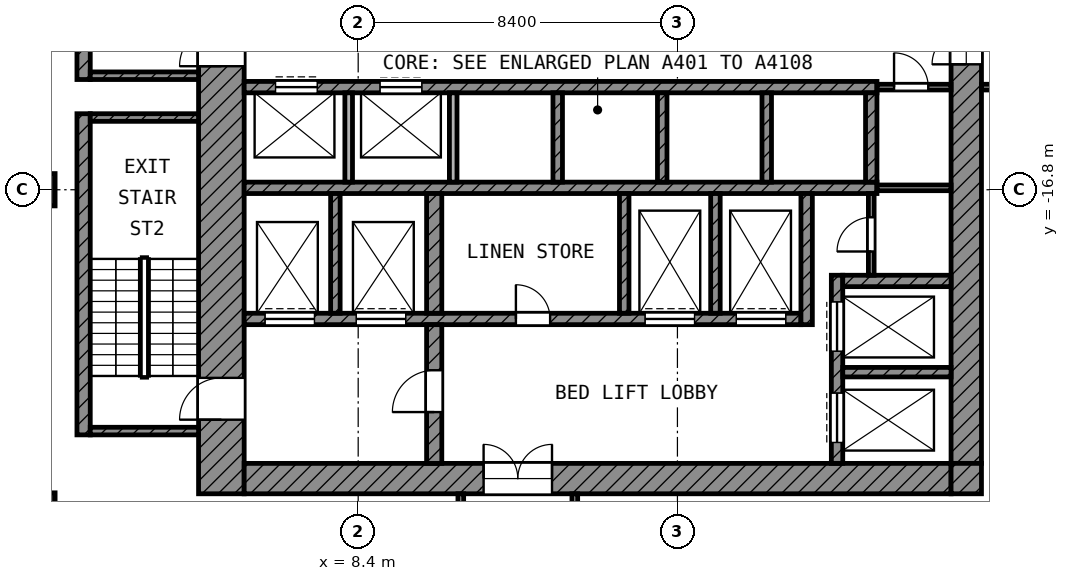
"""IFC4 building model, lengths in metres.
Left out: names, types, materials, properties, quantities, classifications, styles, units other than length and angle.
Written with IfcOpenShell. Run it as: python <this file> out.ifc"""

import sys

from ifc_helpers import new_model, si_unit, direction, frame, frame_2d, origin, origin_2d, place, context, subcontext, project, spatial, rectangle, extrude, element, fill, save


model = new_model("IFC4")
c1 = context("Model", 3, precision=1e-05, world=origin(), true_north=direction((0.0, 1.0)))
c2 = subcontext(c1, "Body", "Model", "MODEL_VIEW")
j1 = project(units=[si_unit("LENGTHUNIT", "METRE"), si_unit("PLANEANGLEUNIT", "RADIAN")], contexts=[c1])
p1 = place(None, origin())
s1 = spatial("IfcSite", under=j1, at=p1, CompositionType="ELEMENT")
p2 = place(p1, origin())
s2 = spatial("IfcBuilding", under=s1, at=p2, CompositionType="ELEMENT")
p3 = place(p2, frame((0.0, 0.0, 247.4)))
s3 = spatial("IfcBuildingStorey", under=s2, at=p3, CompositionType="ELEMENT", Elevation=247.4)
for number, where, z_axis, x_axis in (
    (1, (0.0, -16.8, 0.0), (0.0, 0.0, 1.0), (1.0, 0.0, 0.0)),
    (2, (0.0, -25.2, 0.0), (0.0, 0.0, 1.0), (1.0, 0.0, 0.0)),
):
    element("IfcColumn", number, at=place(p3, frame(where, z_axis=z_axis, x_axis=x_axis)), inside=s3, PredefinedType="COLUMN", context=c2, shape_type="SweptSolid", body=[
        extrude(rectangle(XDim=0.85, YDim=0.85, at=origin_2d()), origin(), (0.0, 0.0, 1.0), 4.2),
    ])
p4 = place(p3, frame((4.8, -24.8, 0.0), z_axis=(0.0, 0.0, 1.0), x_axis=(0.0, 1.0, 0.0)))
e3 = element("IfcWall", 3, at=p4, inside=s3, PredefinedType="SHEAR", context=c2, shape_type="SweptSolid", body=[
    extrude(rectangle(XDim=19.4, YDim=1.2, at=frame_2d((9.7, 0.0))), origin(), (0.0, 0.0, 1.0), 3.6),
])
p5 = place(p4, frame((11.25, 0.0, 0.0)))
e4 = element("IfcOpeningElement", 4, at=p5, cuts=e3, PredefinedType="OPENING", context=c2, shape_type="SweptSolid", body=[
    extrude(rectangle(XDim=1.1, YDim=2.1, at=frame_2d((0.55, 1.05))), frame((0.0, 0.61, 0.0), z_axis=(0.0, -1.0, 0.0), x_axis=(1.0, 0.0, 0.0)), (0.0, 0.0, 1.0), 1.22),
])
p6 = place(p4, frame((1.95, 0.0, 0.0)))
e5 = element("IfcOpeningElement", 5, at=p6, cuts=e3, PredefinedType="OPENING", context=c2, shape_type="SweptSolid", body=[
    extrude(rectangle(XDim=1.1, YDim=2.1, at=frame_2d((0.55, 1.05))), frame((0.0, 0.61, 0.0), z_axis=(0.0, -1.0, 0.0), x_axis=(1.0, 0.0, 0.0)), (0.0, 0.0, 1.0), 1.22),
])
p7 = place(p3, frame((24.4, -24.0, 0.0), z_axis=(0.0, 0.0, 1.0), x_axis=(0.0, 1.0, 0.0)))
e6 = element("IfcWall", 6, at=p7, inside=s3, PredefinedType="SHEAR", context=c2, shape_type="SweptSolid", body=[
    extrude(rectangle(XDim=18.6, YDim=0.8, at=frame_2d((9.3, 0.0))), origin(), (0.0, 0.0, 1.0), 3.6),
])
p8 = place(p7, frame((10.5, 0.0, 0.0)))
e7 = element("IfcOpeningElement", 7, at=p8, cuts=e6, PredefinedType="OPENING", context=c2, shape_type="SweptSolid", body=[
    extrude(rectangle(XDim=1.8, YDim=2.1, at=frame_2d((0.9, 1.05))), frame((0.0, 0.41, 0.0), z_axis=(0.0, -1.0, 0.0), x_axis=(1.0, 0.0, 0.0)), (0.0, 0.0, 1.0), 0.82),
])
p9 = place(p3, frame((5.4, -24.4, 0.0), z_axis=(0.0, 0.0, 1.0), x_axis=(1.0, 0.0, 0.0)))
e8 = element("IfcWall", 8, at=p9, inside=s3, PredefinedType="SHEAR", context=c2, shape_type="SweptSolid", body=[
    extrude(rectangle(XDim=18.6, YDim=0.8, at=frame_2d((9.3, 0.0))), origin(), (0.0, 0.0, 1.0), 3.6),
])
p10 = place(p9, frame((6.3, 0.0, 0.0)))
e9 = element("IfcOpeningElement", 9, at=p10, cuts=e8, PredefinedType="OPENING", context=c2, shape_type="SweptSolid", body=[
    extrude(rectangle(XDim=1.8, YDim=2.1, at=frame_2d((0.9, 1.05))), frame((0.0, 0.41, 0.0), z_axis=(0.0, -1.0, 0.0), x_axis=(1.0, 0.0, 0.0)), (0.0, 0.0, 1.0), 0.82),
])
p11 = place(p3, frame((24.4, -24.8, 0.0), z_axis=(0.0, 0.0, 1.0), x_axis=(0.0, 1.0, 0.0)))
e10 = element("IfcWall", 10, at=p11, inside=s3, PredefinedType="SHEAR", context=c2, shape_type="SweptSolid", body=[
    extrude(rectangle(XDim=0.8, YDim=0.8, at=frame_2d((0.4, 0.0))), origin(), (0.0, 0.0, 1.0), 3.6),
])
p12 = place(p3, frame((5.4, -14.1, 0.0), z_axis=(0.0, 0.0, 1.0), x_axis=(1.0, 0.0, 0.0)))
e11 = element("IfcWall", 11, at=p12, inside=s3, PredefinedType="SHEAR", context=c2, shape_type="SweptSolid", body=[
    extrude(rectangle(XDim=16.65, YDim=0.3, at=frame_2d((8.325, 0.0))), origin(), (0.0, 0.0, 1.0), 3.6),
])
p13 = place(p12, frame((0.825, 0.0, 0.0)))
e12 = element("IfcOpeningElement", 12, at=p13, cuts=e11, PredefinedType="OPENING", context=c2, shape_type="SweptSolid", body=[
    extrude(rectangle(XDim=1.1, YDim=2.1, at=frame_2d((0.55, 1.05))), frame((0.0, 0.16, 0.0), z_axis=(0.0, -1.0, 0.0), x_axis=(1.0, 0.0, 0.0)), (0.0, 0.0, 1.0), 0.32),
])
p14 = place(p12, frame((3.575, 0.0, 0.0)))
e13 = element("IfcOpeningElement", 13, at=p14, cuts=e11, PredefinedType="OPENING", context=c2, shape_type="SweptSolid", body=[
    extrude(rectangle(XDim=1.1, YDim=2.1, at=frame_2d((0.55, 1.05))), frame((0.0, 0.16, 0.0), z_axis=(0.0, -1.0, 0.0), x_axis=(1.0, 0.0, 0.0)), (0.0, 0.0, 1.0), 0.32),
])
p15 = place(p3, frame((5.4, -16.75, 0.0), z_axis=(0.0, 0.0, 1.0), x_axis=(1.0, 0.0, 0.0)))
e14 = element("IfcWall", 14, at=p15, inside=s3, PredefinedType="SHEAR", context=c2, shape_type="SweptSolid", body=[
    extrude(rectangle(XDim=16.65, YDim=0.3, at=frame_2d((8.325, 0.0))), origin(), (0.0, 0.0, 1.0), 3.6),
])
p16 = place(p3, frame((5.4, -20.2, 0.0), z_axis=(0.0, 0.0, 1.0), x_axis=(1.0, 0.0, 0.0)))
e15 = element("IfcWall", 15, at=p16, inside=s3, PredefinedType="SHEAR", context=c2, shape_type="SweptSolid", body=[
    extrude(rectangle(XDim=14.65, YDim=0.3, at=frame_2d((7.325, 0.0))), origin(), (0.0, 0.0, 1.0), 3.6),
])
p17 = place(p16, frame((10.55, 0.0, 0.0)))
e16 = element("IfcOpeningElement", 16, at=p17, cuts=e15, PredefinedType="OPENING", context=c2, shape_type="SweptSolid", body=[
    extrude(rectangle(XDim=1.3, YDim=2.1, at=frame_2d((0.65, 1.05))), frame((0.0, 0.16, 0.0), z_axis=(0.0, -1.0, 0.0), x_axis=(1.0, 0.0, 0.0)), (0.0, 0.0, 1.0), 0.32),
])
p18 = place(p16, frame((12.95, 0.0, 0.0)))
e17 = element("IfcOpeningElement", 17, at=p18, cuts=e15, PredefinedType="OPENING", context=c2, shape_type="SweptSolid", body=[
    extrude(rectangle(XDim=1.3, YDim=2.1, at=frame_2d((0.65, 1.05))), frame((0.0, 0.16, 0.0), z_axis=(0.0, -1.0, 0.0), x_axis=(1.0, 0.0, 0.0)), (0.0, 0.0, 1.0), 0.32),
])
p19 = place(p16, frame((0.55, 0.0, 0.0)))
e18 = element("IfcOpeningElement", 18, at=p19, cuts=e15, PredefinedType="OPENING", context=c2, shape_type="SweptSolid", body=[
    extrude(rectangle(XDim=1.3, YDim=2.1, at=frame_2d((0.65, 1.05))), frame((0.0, 0.16, 0.0), z_axis=(0.0, -1.0, 0.0), x_axis=(1.0, 0.0, 0.0)), (0.0, 0.0, 1.0), 0.32),
])
p20 = place(p16, frame((2.95, 0.0, 0.0)))
e19 = element("IfcOpeningElement", 19, at=p20, cuts=e15, PredefinedType="OPENING", context=c2, shape_type="SweptSolid", body=[
    extrude(rectangle(XDim=1.3, YDim=2.1, at=frame_2d((0.65, 1.05))), frame((0.0, 0.16, 0.0), z_axis=(0.0, -1.0, 0.0), x_axis=(1.0, 0.0, 0.0)), (0.0, 0.0, 1.0), 0.32),
])
p21 = place(p16, frame((7.15, 0.0, 0.0)))
e20 = element("IfcOpeningElement", 20, at=p21, cuts=e15, PredefinedType="OPENING", context=c2, shape_type="SweptSolid", body=[
    extrude(rectangle(XDim=0.9, YDim=2.1, at=frame_2d((0.45, 1.05))), frame((0.0, 0.16, 0.0), z_axis=(0.0, -1.0, 0.0), x_axis=(1.0, 0.0, 0.0)), (0.0, 0.0, 1.0), 0.32),
])
p22 = place(p3, frame((10.4, -24.0, 0.0), z_axis=(0.0, 0.0, 1.0), x_axis=(0.0, 1.0, 0.0)))
e21 = element("IfcWall", 21, at=p22, inside=s3, PredefinedType="SHEAR", context=c2, shape_type="SweptSolid", body=[
    extrude(rectangle(XDim=3.65, YDim=0.4, at=frame_2d((1.825, 0.0))), origin(), (0.0, 0.0, 1.0), 3.6),
])
p23 = place(p22, frame((1.35, 0.0, 0.0)))
e22 = element("IfcOpeningElement", 22, at=p23, cuts=e21, PredefinedType="OPENING", context=c2, shape_type="SweptSolid", body=[
    extrude(rectangle(XDim=1.1, YDim=2.1, at=frame_2d((0.55, 1.05))), frame((0.0, 0.21, 0.0), z_axis=(0.0, -1.0, 0.0), x_axis=(1.0, 0.0, 0.0)), (0.0, 0.0, 1.0), 0.42),
])
p24 = place(p3, frame((10.4, -20.05, 0.0), z_axis=(0.0, 0.0, 1.0), x_axis=(0.0, 1.0, 0.0)))
e23 = element("IfcWall", 23, at=p24, inside=s3, PredefinedType="SHEAR", context=c2, shape_type="SweptSolid", body=[
    extrude(rectangle(XDim=3.15, YDim=0.4, at=frame_2d((1.575, 0.0))), origin(), (0.0, 0.0, 1.0), 3.6),
])
p25 = place(p3, frame((20.2, -20.35, 0.0), z_axis=(0.0, 0.0, 1.0), x_axis=(0.0, 1.0, 0.0)))
e24 = element("IfcWall", 24, at=p25, inside=s3, PredefinedType="SHEAR", context=c2, shape_type="SweptSolid", body=[
    extrude(rectangle(XDim=3.45, YDim=0.3, at=frame_2d((1.725, 0.0))), origin(), (0.0, 0.0, 1.0), 3.6),
])
p26 = place(p3, frame((21.9, -16.6, 0.0), z_axis=(0.0, 0.0, 1.0), x_axis=(0.0, 1.0, 0.0)))
e25 = element("IfcWall", 25, at=p26, inside=s3, PredefinedType="SHEAR", context=c2, shape_type="SweptSolid", body=[
    extrude(rectangle(XDim=2.35, YDim=0.3, at=frame_2d((1.175, 0.0))), origin(), (0.0, 0.0, 1.0), 3.6),
])
p27 = place(p3, frame((21.15, -19.2, 0.0), z_axis=(0.0, 0.0, 1.0), x_axis=(1.0, 0.0, 0.0)))
e26 = element("IfcWall", 26, at=p27, inside=s3, PredefinedType="SHEAR", context=c2, shape_type="SweptSolid", body=[
    extrude(rectangle(XDim=2.85, YDim=0.3, at=frame_2d((1.425, 0.0))), origin(), (0.0, 0.0, 1.0), 3.6),
])
p28 = place(p3, frame((21.0, -24.0, 0.0), z_axis=(0.0, 0.0, 1.0), x_axis=(0.0, 1.0, 0.0)))
e27 = element("IfcWall", 27, at=p28, inside=s3, PredefinedType="SHEAR", context=c2, shape_type="SweptSolid", body=[
    extrude(rectangle(XDim=4.95, YDim=0.3, at=frame_2d((2.475, 0.0))), origin(), (0.0, 0.0, 1.0), 3.6),
])
p29 = place(p28, frame((2.95, 0.0, 0.0)))
e28 = element("IfcOpeningElement", 28, at=p29, cuts=e27, PredefinedType="OPENING", context=c2, shape_type="SweptSolid", body=[
    extrude(rectangle(XDim=1.3, YDim=2.1, at=frame_2d((0.65, 1.05))), frame((0.0, 0.16, 0.0), z_axis=(0.0, -1.0, 0.0), x_axis=(1.0, 0.0, 0.0)), (0.0, 0.0, 1.0), 0.32),
])
p30 = place(p28, frame((0.55, 0.0, 0.0)))
e29 = element("IfcOpeningElement", 29, at=p30, cuts=e27, PredefinedType="OPENING", context=c2, shape_type="SweptSolid", body=[
    extrude(rectangle(XDim=1.3, YDim=2.1, at=frame_2d((0.65, 1.05))), frame((0.0, 0.16, 0.0), z_axis=(0.0, -1.0, 0.0), x_axis=(1.0, 0.0, 0.0)), (0.0, 0.0, 1.0), 0.32),
])
p31 = place(p3, frame((21.15, -21.6, 0.0), z_axis=(0.0, 0.0, 1.0), x_axis=(1.0, 0.0, 0.0)))
e30 = element("IfcWall", 30, at=p31, inside=s3, PredefinedType="SHEAR", context=c2, shape_type="SweptSolid", body=[
    extrude(rectangle(XDim=2.85, YDim=0.25, at=frame_2d((1.425, 0.0))), origin(), (0.0, 0.0, 1.0), 3.6),
])
for number, where, z_axis, x_axis in (
    (31, (7.8, -20.05, 0.0), (0.0, 0.0, 1.0), (0.0, 1.0, 0.0)),
    (32, (15.4, -20.05, 0.0), (0.0, 0.0, 1.0), (0.0, 1.0, 0.0)),
    (33, (17.8, -20.05, 0.0), (0.0, 0.0, 1.0), (0.0, 1.0, 0.0)),
):
    element("IfcWall", number, at=place(p3, frame(where, z_axis=z_axis, x_axis=x_axis)), inside=s3, PredefinedType="SHEAR", context=c2, shape_type="SweptSolid", body=[
        extrude(rectangle(XDim=3.15, YDim=0.25, at=frame_2d((1.575, 0.0))), origin(), (0.0, 0.0, 1.0), 3.6),
    ])
for number, where, z_axis, x_axis in (
    (34, (8.15, -16.6, 0.0), (0.0, 0.0, 1.0), (0.0, 1.0, 0.0)),
    (35, (10.9, -16.6, 0.0), (0.0, 0.0, 1.0), (0.0, 1.0, 0.0)),
):
    element("IfcWall", number, at=place(p3, frame(where, z_axis=z_axis, x_axis=x_axis)), inside=s3, PredefinedType="PARTITIONING", context=c2, shape_type="SweptSolid", body=[
        extrude(rectangle(XDim=2.35, YDim=0.2, at=frame_2d((1.175, 0.0))), origin(), (0.0, 0.0, 1.0), 3.6),
    ])
for number, where, z_axis, x_axis in (
    (36, (13.65, -16.6, 0.0), (0.0, 0.0, 1.0), (0.0, 1.0, 0.0)),
    (37, (16.4, -16.6, 0.0), (0.0, 0.0, 1.0), (0.0, 1.0, 0.0)),
    (38, (19.15, -16.6, 0.0), (0.0, 0.0, 1.0), (0.0, 1.0, 0.0)),
):
    element("IfcWall", number, at=place(p3, frame(where, z_axis=z_axis, x_axis=x_axis)), inside=s3, PredefinedType="SHEAR", context=c2, shape_type="SweptSolid", body=[
        extrude(rectangle(XDim=2.35, YDim=0.25, at=frame_2d((1.175, 0.0))), origin(), (0.0, 0.0, 1.0), 3.6),
    ])
p32 = place(p3, frame((21.9, -19.05, 0.0), z_axis=(0.0, 0.0, 1.0), x_axis=(0.0, 1.0, 0.0)))
e39 = element("IfcWall", 39, at=p32, inside=s3, PredefinedType="PARTITIONING", context=c2, shape_type="SweptSolid", body=[
    extrude(rectangle(XDim=2.15, YDim=0.15, at=frame_2d((1.075, 0.0))), origin(), (0.0, 0.0, 1.0), 3.6),
])
p33 = place(p32, frame((0.625, 0.0, 0.0)))
e40 = element("IfcOpeningElement", 40, at=p33, cuts=e39, PredefinedType="OPENING", context=c2, shape_type="SweptSolid", body=[
    extrude(rectangle(XDim=0.9, YDim=2.1, at=frame_2d((0.45, 1.05))), frame((0.0, 0.085, 0.0), z_axis=(0.0, -1.0, 0.0), x_axis=(1.0, 0.0, 0.0)), (0.0, 0.0, 1.0), 0.17),
])
p34 = place(p3, frame((22.05, -16.75, 0.0), z_axis=(0.0, 0.0, 1.0), x_axis=(1.0, 0.0, 0.0)))
e41 = element("IfcWall", 41, at=p34, inside=s3, PredefinedType="PARTITIONING", context=c2, shape_type="SweptSolid", body=[
    extrude(rectangle(XDim=1.95, YDim=0.15, at=frame_2d((0.975, 0.0))), origin(), (0.0, 0.0, 1.0), 3.6),
])
p35 = place(p3, frame((22.05, -14.1, 0.0), z_axis=(0.0, 0.0, 1.0), x_axis=(1.0, 0.0, 0.0)))
e42 = element("IfcWall", 42, at=p35, inside=s3, PredefinedType="PARTITIONING", context=c2, shape_type="SweptSolid", body=[
    extrude(rectangle(XDim=1.95, YDim=0.15, at=frame_2d((0.975, 0.0))), origin(), (0.0, 0.0, 1.0), 3.6),
])
p36 = place(p35, frame((0.45, 0.0, 0.0)))
e43 = element("IfcOpeningElement", 43, at=p36, cuts=e42, PredefinedType="OPENING", context=c2, shape_type="SweptSolid", body=[
    extrude(rectangle(XDim=0.9, YDim=2.1, at=frame_2d((0.45, 1.05))), frame((0.0, 0.085, 0.0), z_axis=(0.0, -1.0, 0.0), x_axis=(1.0, 0.0, 0.0)), (0.0, 0.0, 1.0), 0.17),
])
p37 = place(p3, frame((1.175, -13.9, 0.0), z_axis=(0.0, 0.0, 1.0), x_axis=(0.0, 1.0, 0.0)))
e44 = element("IfcWall", 44, at=p37, inside=s3, PredefinedType="SHEAR", context=c2, shape_type="SweptSolid", body=[
    extrude(rectangle(XDim=8.45, YDim=0.35, at=frame_2d((4.225, 0.0))), origin(), (0.0, 0.0, 1.0), 3.6),
])
p38 = place(p3, frame((1.35, -13.8, 0.0), z_axis=(0.0, 0.0, 1.0), x_axis=(1.0, 0.0, 0.0)))
e45 = element("IfcWall", 45, at=p38, inside=s3, PredefinedType="SHEAR", context=c2, shape_type="SweptSolid", body=[
    extrude(rectangle(XDim=2.85, YDim=0.2, at=frame_2d((1.425, 0.0))), origin(), (0.0, 0.0, 1.0), 3.6),
])
p39 = place(p3, frame((1.175, -23.25, 0.0), z_axis=(0.0, 0.0, 1.0), x_axis=(0.0, 1.0, 0.0)))
e46 = element("IfcWall", 46, at=p39, inside=s3, PredefinedType="SHEAR", context=c2, shape_type="SweptSolid", body=[
    extrude(rectangle(XDim=8.45, YDim=0.35, at=frame_2d((4.225, 0.0))), origin(), (0.0, 0.0, 1.0), 3.6),
])
for number, where, z_axis, x_axis in (
    (47, (1.35, -14.9, 0.0), (0.0, 0.0, 1.0), (1.0, 0.0, 0.0)),
    (48, (1.35, -23.15, 0.0), (0.0, 0.0, 1.0), (1.0, 0.0, 0.0)),
):
    element("IfcWall", number, at=place(p3, frame(where, z_axis=z_axis, x_axis=x_axis)), inside=s3, PredefinedType="SHEAR", context=c2, shape_type="SweptSolid", body=[
        extrude(rectangle(XDim=2.85, YDim=0.2, at=frame_2d((1.425, 0.0))), origin(), (0.0, 0.0, 1.0), 3.6),
    ])
p40 = place(p3, frame((24.8, -14.1, 0.0), z_axis=(0.0, 0.0, 1.0), x_axis=(1.0, 0.0, 0.0)))
e49 = element("IfcWall", 49, at=p40, inside=s3, PredefinedType="PARTITIONING", context=c2, shape_type="SweptSolid", body=[
    extrude(rectangle(XDim=4.525, YDim=0.15, at=frame_2d((2.262, 0.0))), origin(), (0.0, 0.0, 1.0), 3.6),
])
p41 = place(p40, frame((1.75, 0.0, 0.0)))
e50 = element("IfcOpeningElement", 50, at=p41, cuts=e49, PredefinedType="OPENING", context=c2, shape_type="SweptSolid", body=[
    extrude(rectangle(XDim=1.5, YDim=2.1, at=frame_2d((0.75, 1.05))), frame((0.0, 0.085, 0.0), z_axis=(0.0, -1.0, 0.0), x_axis=(1.0, 0.0, 0.0)), (0.0, 0.0, 1.0), 0.17),
])
for number, where, z_axis, x_axis in (
    (51, (11.1, -29.4, 0.0), (0.0, 0.0, 1.0), (0.0, 1.0, 0.0)),
    (52, (14.1, -29.4, 0.0), (0.0, 0.0, 1.0), (0.0, 1.0, 0.0)),
):
    element("IfcWall", number, at=place(p3, frame(where, z_axis=z_axis, x_axis=x_axis)), inside=s3, PredefinedType="PARTITIONING", context=c2, shape_type="SweptSolid", body=[
        extrude(rectangle(XDim=4.6, YDim=0.15, at=frame_2d((2.3, 0.0))), origin(), (0.0, 0.0, 1.0), 3.6),
    ])
p42 = place(p13, origin())
e53 = element("IfcDoor", 53, at=p42, inside=s3, OperationType="DOUBLE_DOOR_SLIDING", PredefinedType="DOOR", context=c2, shape_type="SweptSolid", body=[
    extrude(rectangle(XDim=1.1, YDim=2.1, at=frame_2d((0.55, 1.05))), frame((0.0, 0.025, 0.0), z_axis=(0.0, -1.0, 0.0), x_axis=(1.0, 0.0, 0.0)), (0.0, 0.0, 1.0), 0.05),
])
fill(e12, e53)
p43 = place(p14, origin())
e54 = element("IfcDoor", 54, at=p43, inside=s3, OperationType="DOUBLE_DOOR_SLIDING", PredefinedType="DOOR", context=c2, shape_type="SweptSolid", body=[
    extrude(rectangle(XDim=1.1, YDim=2.1, at=frame_2d((0.55, 1.05))), frame((0.0, 0.025, 0.0), z_axis=(0.0, -1.0, 0.0), x_axis=(1.0, 0.0, 0.0)), (0.0, 0.0, 1.0), 0.05),
])
fill(e13, e54)
p44 = place(p29, origin())
e55 = element("IfcDoor", 55, at=p44, inside=s3, OperationType="DOUBLE_DOOR_SLIDING", PredefinedType="DOOR", context=c2, shape_type="SweptSolid", body=[
    extrude(rectangle(XDim=1.3, YDim=2.1, at=frame_2d((0.65, 1.05))), frame((0.0, 0.025, 0.0), z_axis=(0.0, -1.0, 0.0), x_axis=(1.0, 0.0, 0.0)), (0.0, 0.0, 1.0), 0.05),
])
fill(e28, e55)
p45 = place(p30, origin())
e56 = element("IfcDoor", 56, at=p45, inside=s3, OperationType="DOUBLE_DOOR_SLIDING", PredefinedType="DOOR", context=c2, shape_type="SweptSolid", body=[
    extrude(rectangle(XDim=1.3, YDim=2.1, at=frame_2d((0.65, 1.05))), frame((0.0, 0.025, 0.0), z_axis=(0.0, -1.0, 0.0), x_axis=(1.0, 0.0, 0.0)), (0.0, 0.0, 1.0), 0.05),
])
fill(e29, e56)
p46 = place(p17, origin())
e57 = element("IfcDoor", 57, at=p46, inside=s3, OperationType="DOUBLE_DOOR_SLIDING", PredefinedType="DOOR", context=c2, shape_type="SweptSolid", body=[
    extrude(rectangle(XDim=1.3, YDim=2.1, at=frame_2d((0.65, 1.05))), frame((0.0, 0.025, 0.0), z_axis=(0.0, -1.0, 0.0), x_axis=(1.0, 0.0, 0.0)), (0.0, 0.0, 1.0), 0.05),
])
fill(e16, e57)
p47 = place(p18, origin())
e58 = element("IfcDoor", 58, at=p47, inside=s3, OperationType="DOUBLE_DOOR_SLIDING", PredefinedType="DOOR", context=c2, shape_type="SweptSolid", body=[
    extrude(rectangle(XDim=1.3, YDim=2.1, at=frame_2d((0.65, 1.05))), frame((0.0, 0.025, 0.0), z_axis=(0.0, -1.0, 0.0), x_axis=(1.0, 0.0, 0.0)), (0.0, 0.0, 1.0), 0.05),
])
fill(e17, e58)
p48 = place(p19, origin())
e59 = element("IfcDoor", 59, at=p48, inside=s3, OperationType="DOUBLE_DOOR_SLIDING", PredefinedType="DOOR", context=c2, shape_type="SweptSolid", body=[
    extrude(rectangle(XDim=1.3, YDim=2.1, at=frame_2d((0.65, 1.05))), frame((0.0, 0.025, 0.0), z_axis=(0.0, -1.0, 0.0), x_axis=(1.0, 0.0, 0.0)), (0.0, 0.0, 1.0), 0.05),
])
fill(e18, e59)
p49 = place(p20, origin())
e60 = element("IfcDoor", 60, at=p49, inside=s3, OperationType="DOUBLE_DOOR_SLIDING", PredefinedType="DOOR", context=c2, shape_type="SweptSolid", body=[
    extrude(rectangle(XDim=1.3, YDim=2.1, at=frame_2d((0.65, 1.05))), frame((0.0, 0.025, 0.0), z_axis=(0.0, -1.0, 0.0), x_axis=(1.0, 0.0, 0.0)), (0.0, 0.0, 1.0), 0.05),
])
fill(e19, e60)
p50 = place(p5, origin())
e61 = element("IfcDoor", 61, at=p50, inside=s3, OperationType="SINGLE_SWING_LEFT", PredefinedType="DOOR", context=c2, shape_type="SweptSolid", body=[
    extrude(rectangle(XDim=1.1, YDim=2.1, at=frame_2d((0.55, 1.05))), frame((0.0, 0.025, 0.0), z_axis=(0.0, -1.0, 0.0), x_axis=(1.0, 0.0, 0.0)), (0.0, 0.0, 1.0), 0.05),
])
fill(e4, e61)
p51 = place(p6, origin())
e62 = element("IfcDoor", 62, at=p51, inside=s3, OperationType="SINGLE_SWING_LEFT", PredefinedType="DOOR", context=c2, shape_type="SweptSolid", body=[
    extrude(rectangle(XDim=1.1, YDim=2.1, at=frame_2d((0.55, 1.05))), frame((0.0, 0.025, 0.0), z_axis=(0.0, -1.0, 0.0), x_axis=(1.0, 0.0, 0.0)), (0.0, 0.0, 1.0), 0.05),
])
fill(e5, e62)
p52 = place(p23, origin())
e63 = element("IfcDoor", 63, at=p52, inside=s3, OperationType="SINGLE_SWING_LEFT", PredefinedType="DOOR", context=c2, shape_type="SweptSolid", body=[
    extrude(rectangle(XDim=1.1, YDim=2.1, at=frame_2d((0.55, 1.05))), frame((0.0, 0.025, 0.0), z_axis=(0.0, -1.0, 0.0), x_axis=(1.0, 0.0, 0.0)), (0.0, 0.0, 1.0), 0.05),
])
fill(e22, e63)
p53 = place(p8, origin())
e64 = element("IfcDoor", 64, at=p53, inside=s3, OperationType="DOUBLE_DOOR_SINGLE_SWING", PredefinedType="DOOR", context=c2, shape_type="SweptSolid", body=[
    extrude(rectangle(XDim=1.8, YDim=2.1, at=frame_2d((0.9, 1.05))), frame((0.0, 0.025, 0.0), z_axis=(0.0, -1.0, 0.0), x_axis=(1.0, 0.0, 0.0)), (0.0, 0.0, 1.0), 0.05),
])
fill(e7, e64)
p54 = place(p10, origin())
e65 = element("IfcDoor", 65, at=p54, inside=s3, OperationType="DOUBLE_DOOR_SINGLE_SWING", PredefinedType="DOOR", context=c2, shape_type="SweptSolid", body=[
    extrude(rectangle(XDim=1.8, YDim=2.1, at=frame_2d((0.9, 1.05))), frame((0.0, 0.025, 0.0), z_axis=(0.0, -1.0, 0.0), x_axis=(1.0, 0.0, 0.0)), (0.0, 0.0, 1.0), 0.05),
])
fill(e9, e65)
p55 = place(p36, origin())
e66 = element("IfcDoor", 66, at=p55, inside=s3, OperationType="SINGLE_SWING_LEFT", PredefinedType="DOOR", context=c2, shape_type="SweptSolid", body=[
    extrude(rectangle(XDim=0.9, YDim=2.1, at=frame_2d((0.45, 1.05))), frame((0.0, 0.025, 0.0), z_axis=(0.0, -1.0, 0.0), x_axis=(1.0, 0.0, 0.0)), (0.0, 0.0, 1.0), 0.05),
])
fill(e43, e66)
p56 = place(p33, origin())
e67 = element("IfcDoor", 67, at=p56, inside=s3, OperationType="SINGLE_SWING_LEFT", PredefinedType="DOOR", context=c2, shape_type="SweptSolid", body=[
    extrude(rectangle(XDim=0.9, YDim=2.1, at=frame_2d((0.45, 1.05))), frame((0.0, 0.025, 0.0), z_axis=(0.0, -1.0, 0.0), x_axis=(1.0, 0.0, 0.0)), (0.0, 0.0, 1.0), 0.05),
])
fill(e40, e67)
p57 = place(p21, origin())
e68 = element("IfcDoor", 68, at=p57, inside=s3, OperationType="SINGLE_SWING_LEFT", PredefinedType="DOOR", context=c2, shape_type="SweptSolid", body=[
    extrude(rectangle(XDim=0.9, YDim=2.1, at=frame_2d((0.45, 1.05))), frame((0.0, 0.025, 0.0), z_axis=(0.0, -1.0, 0.0), x_axis=(1.0, 0.0, 0.0)), (0.0, 0.0, 1.0), 0.05),
])
fill(e20, e68)
save(model, sys.argv[1])
